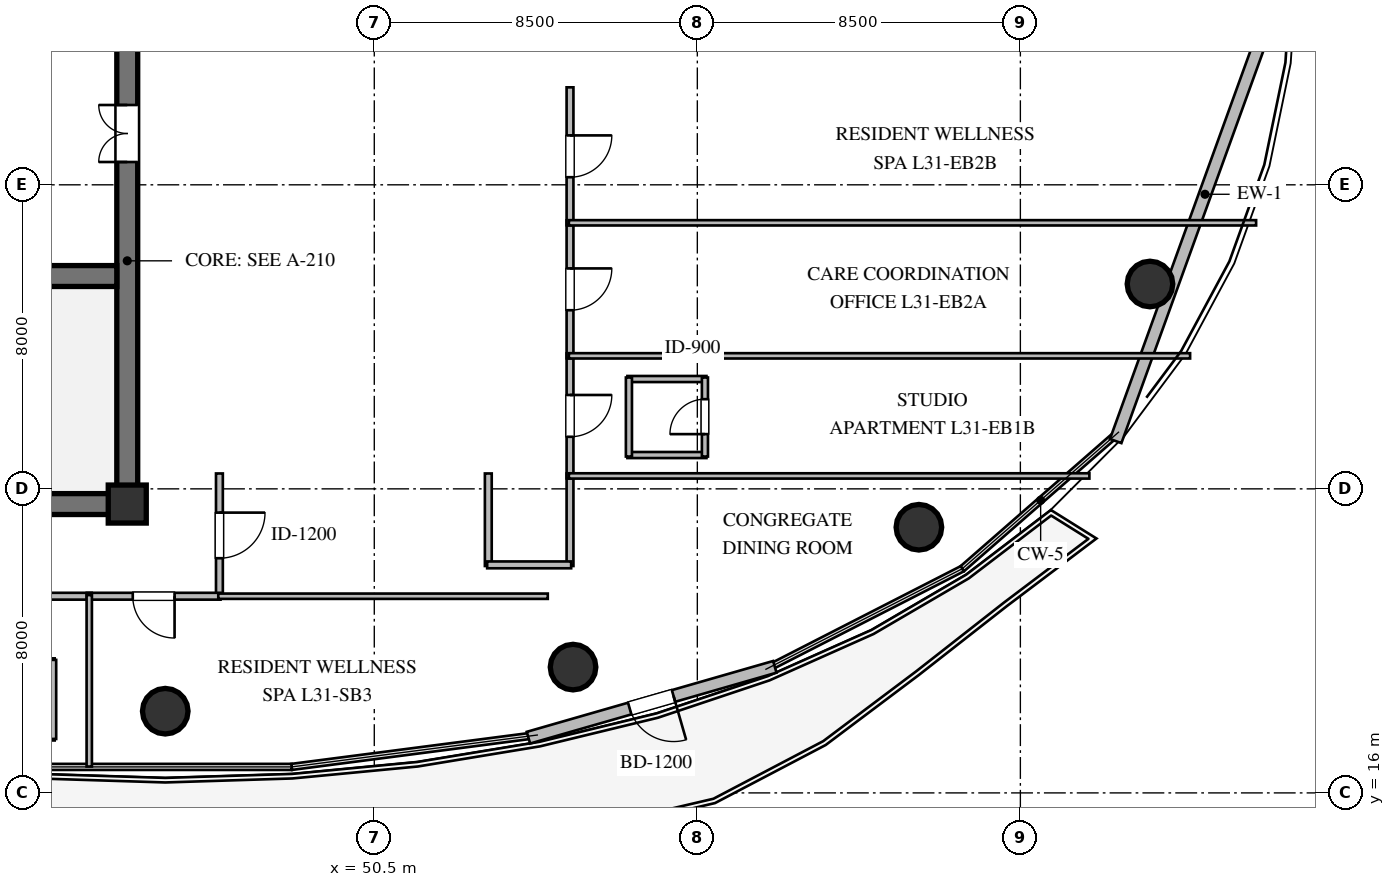
"""IFC4 building model, lengths in metres.
Left out: names, types, materials, properties, quantities, classifications, styles, units other than length and angle.
Written with IfcOpenShell. Run it as: python <this file> out.ifc"""

import sys

from ifc_helpers import new_model, si_unit, direction, frame, frame_2d, origin, origin_2d, place, context, subcontext, project, spatial, rectangle, circle, extrude, element, fill, save


model = new_model("IFC4")
c1 = context("Model", 3, precision=1e-05, world=origin(), true_north=direction((0.0, 1.0)))
c2 = subcontext(c1, "Body", "Model", "MODEL_VIEW")
j1 = project(units=[si_unit("LENGTHUNIT", "METRE"), si_unit("PLANEANGLEUNIT", "RADIAN")], contexts=[c1])
p1 = place(None, origin())
s1 = spatial("IfcSite", under=j1, at=p1, CompositionType="ELEMENT")
p2 = place(p1, origin())
s2 = spatial("IfcBuilding", under=s1, at=p2, CompositionType="ELEMENT")
p3 = place(p2, frame((0.0, 0.0, 120.6)))
s3 = spatial("IfcBuildingStorey", under=s2, at=p3, CompositionType="ELEMENT", Elevation=120.6)
p4 = place(p3, frame((21.725, 23.6, 0.0), z_axis=(0.0, 0.0, 1.0), x_axis=(1.0, 0.0, 0.0)))
e1 = element("IfcWall", 1, at=p4, inside=s3, PredefinedType="SHEAR", context=c2, shape_type="SweptSolid", body=[
    extrude(rectangle(XDim=22.55, YDim=0.55, at=frame_2d((11.275, 0.0))), origin(), (0.0, 0.0, 1.0), 3.36),
])
p5 = place(p3, frame((44.0, 23.875, 0.0), z_axis=(0.0, 0.0, 1.0), x_axis=(0.0, 1.0, 0.0)))
e2 = element("IfcWall", 2, at=p5, inside=s3, PredefinedType="SHEAR", context=c2, shape_type="SweptSolid", body=[
    extrude(rectangle(XDim=12.25, YDim=0.55, at=frame_2d((6.125, 0.0))), origin(), (0.0, 0.0, 1.0), 3.36),
])
p6 = place(p5, frame((8.725, 0.0, 0.0)))
e3 = element("IfcOpeningElement", 3, at=p6, cuts=e2, PredefinedType="OPENING", context=c2, shape_type="SweptSolid", body=[
    extrude(rectangle(XDim=1.5, YDim=2.15, at=frame_2d((0.75, 1.075))), frame((0.0, 0.285, 0.0), z_axis=(0.0, -1.0, 0.0), x_axis=(1.0, 0.0, 0.0)), (0.0, 0.0, 1.0), 0.57),
])
p7 = place(p3, frame((22.275, 29.6, 0.0), z_axis=(0.0, 0.0, 1.0), x_axis=(1.0, 0.0, 0.0)))
e4 = element("IfcWall", 4, at=p7, inside=s3, PredefinedType="SHEAR", context=c2, shape_type="SweptSolid", body=[
    extrude(rectangle(XDim=21.45, YDim=0.55, at=frame_2d((10.725, 0.0))), origin(), (0.0, 0.0, 1.0), 3.36),
])
p8 = place(p7, frame((12.175, 0.0, 0.0)))
e5 = element("IfcOpeningElement", 5, at=p8, cuts=e4, PredefinedType="OPENING", context=c2, shape_type="SweptSolid", body=[
    extrude(rectangle(XDim=1.15, YDim=2.1, at=frame_2d((0.575, 1.05))), frame((0.0, 0.285, 0.0), z_axis=(0.0, -1.0, 0.0), x_axis=(1.0, 0.0, 0.0)), (0.0, 0.0, 1.0), 0.57),
])
p9 = place(p3, frame((44.0, 23.6, 0.0), z_axis=(0.0, 0.0, 1.0), x_axis=(1.0, 0.0, 0.0)))
e6 = element("IfcColumn", 6, at=p9, inside=s3, PredefinedType="COLUMN", context=c2, shape_type="SweptSolid", body=[
    extrude(rectangle(XDim=1.0, YDim=1.0, at=origin_2d()), origin(), (0.0, 0.0, 1.0), 3.6),
])
for number, where, z_axis, x_axis in (
    (7, (45.0, 18.15, 0.0), (0.0, 0.0, 1.0), (1.0, 0.0, 0.0)),
    (8, (55.73, 19.31, 0.0), (0.0, 0.0, 1.0), (1.0, 0.0, 0.0)),
    (9, (64.83, 22.99, 0.0), (0.0, 0.0, 1.0), (1.0, 0.0, 0.0)),
    (10, (70.91, 29.39, 0.0), (0.0, 0.0, 1.0), (1.0, 0.0, 0.0)),
):
    element("IfcColumn", number, at=place(p3, frame(where, z_axis=z_axis, x_axis=x_axis)), inside=s3, PredefinedType="COLUMN", context=c2, shape_type="SweptSolid", body=[
        extrude(circle(Radius=0.6, at=origin_2d()), origin(), (0.0, 0.0, 1.0), 3.6),
    ])
p10 = place(p3, frame((74.708, 38.244, 0.0), z_axis=(0.0, 0.0, 1.0), x_axis=(-0.340324669139, -0.94030799187, 0.0)))
e11 = element("IfcWall", 11, at=p10, inside=s3, PredefinedType="STANDARD", context=c2, shape_type="SweptSolid", body=[
    extrude(rectangle(XDim=13.81, YDim=0.32, at=frame_2d((6.905, 0.0))), origin(), (0.0, 0.0, 1.0), 3.36),
])
p11 = place(p3, frame((61.039, 19.317, 0.0), z_axis=(0.0, 0.0, 1.0), x_axis=(-0.96106509915, -0.276322049784, 0.0)))
e12 = element("IfcWall", 12, at=p11, inside=s3, PredefinedType="STANDARD", context=c2, shape_type="SweptSolid", body=[
    extrude(rectangle(XDim=6.746, YDim=0.32, at=frame_2d((3.373, 0.0))), origin(), (0.0, 0.0, 1.0), 3.36),
])
p12 = place(p11, frame((2.773, 0.0, 0.0)))
e13 = element("IfcOpeningElement", 13, at=p12, cuts=e12, PredefinedType="OPENING", context=c2, shape_type="SweptSolid", body=[
    extrude(rectangle(XDim=1.2, YDim=2.15, at=frame_2d((0.6, 1.075))), frame((0.0, 0.17, 0.0), z_axis=(0.0, -1.0, 0.0), x_axis=(1.0, 0.0, 0.0)), (0.0, 0.0, 1.0), 0.34),
])
p13 = place(p3, frame((57.16, 24.89, 0.0), z_axis=(0.0, 0.0, 1.0), x_axis=(1.0, 0.0, 0.0)))
e14 = element("IfcWall", 14, at=p13, inside=s3, PredefinedType="PLUMBINGWALL", context=c2, shape_type="SweptSolid", body=[
    extrude(rectangle(XDim=2.08, YDim=0.16, at=frame_2d((1.04, 0.0))), origin(), (0.0, 0.0, 1.0), 3.36),
])
p14 = place(p3, frame((57.16, 26.89, 0.0), z_axis=(0.0, 0.0, 1.0), x_axis=(1.0, 0.0, 0.0)))
e15 = element("IfcWall", 15, at=p14, inside=s3, PredefinedType="PLUMBINGWALL", context=c2, shape_type="SweptSolid", body=[
    extrude(rectangle(XDim=2.08, YDim=0.16, at=frame_2d((1.04, 0.0))), origin(), (0.0, 0.0, 1.0), 2.89),
])
p15 = place(p3, frame((57.2, 24.85, 0.0), z_axis=(0.0, 0.0, 1.0), x_axis=(0.0, 1.0, 0.0)))
e16 = element("IfcWall", 16, at=p15, inside=s3, PredefinedType="PLUMBINGWALL", context=c2, shape_type="SweptSolid", body=[
    extrude(rectangle(XDim=2.08, YDim=0.16, at=frame_2d((1.04, 0.0))), origin(), (0.0, 0.0, 1.0), 3.36),
])
p16 = place(p3, frame((59.2, 24.85, 0.0), z_axis=(0.0, 0.0, 1.0), x_axis=(0.0, 1.0, 0.0)))
e17 = element("IfcWall", 17, at=p16, inside=s3, PredefinedType="PLUMBINGWALL", context=c2, shape_type="SweptSolid", body=[
    extrude(rectangle(XDim=2.08, YDim=0.16, at=frame_2d((1.04, 0.0))), origin(), (0.0, 0.0, 1.0), 2.996),
])
p17 = place(p16, frame((0.59, 0.0, 0.0)))
e18 = element("IfcOpeningElement", 18, at=p17, cuts=e17, PredefinedType="OPENING", context=c2, shape_type="SweptSolid", body=[
    extrude(rectangle(XDim=0.92, YDim=2.1, at=frame_2d((0.46, 1.05))), frame((0.0, 0.09, 0.0), z_axis=(0.0, -1.0, 0.0), x_axis=(1.0, 0.0, 0.0)), (0.0, 0.0, 1.0), 0.18),
])
for number, where, z_axis, x_axis in (
    (19, (40.01, 17.46, 0.0), (0.0, 0.0, 1.0), (1.0, 0.0, 0.0)),
    (20, (40.01, 19.46, 0.0), (0.0, 0.0, 1.0), (1.0, 0.0, 0.0)),
    (21, (42.05, 17.42, 0.0), (0.0, 0.0, 1.0), (0.0, 1.0, 0.0)),
):
    element("IfcWall", number, at=place(p3, frame(where, z_axis=z_axis, x_axis=x_axis)), inside=s3, PredefinedType="PLUMBINGWALL", context=c2, shape_type="SweptSolid", body=[
        extrude(rectangle(XDim=2.08, YDim=0.16, at=frame_2d((1.04, 0.0))), origin(), (0.0, 0.0, 1.0), 3.36),
    ])
p18 = place(p3, frame((46.425, 24.405, 0.0), z_axis=(0.0, 0.0, 1.0), x_axis=(0.0, -1.0, 0.0)))
e22 = element("IfcWall", 22, at=p18, inside=s3, PredefinedType="PARTITIONING", context=c2, shape_type="SweptSolid", body=[
    extrude(rectangle(XDim=3.26, YDim=0.18, at=frame_2d((1.63, 0.0))), origin(), (0.0, 0.0, 1.0), 3.36),
])
p19 = place(p18, frame((1.03, 0.0, 0.0)))
e23 = element("IfcOpeningElement", 23, at=p19, cuts=e22, PredefinedType="OPENING", context=c2, shape_type="SweptSolid", body=[
    extrude(rectangle(XDim=1.2, YDim=2.15, at=frame_2d((0.6, 1.075))), frame((0.0, 0.1, 0.0), z_axis=(0.0, -1.0, 0.0), x_axis=(1.0, 0.0, 0.0)), (0.0, 0.0, 1.0), 0.2),
])
for number, where, z_axis, x_axis in (
    (24, (55.65, 24.405, 0.0), (0.0, 0.0, 1.0), (0.0, -1.0, 0.0)),
    (25, (53.5, 21.97, 0.0), (0.0, 0.0, 1.0), (0.0, 1.0, 0.0)),
):
    element("IfcWall", number, at=place(p3, frame(where, z_axis=z_axis, x_axis=x_axis)), inside=s3, PredefinedType="PARTITIONING", context=c2, shape_type="SweptSolid", body=[
        extrude(rectangle(XDim=2.435, YDim=0.18, at=frame_2d((1.218, 0.0))), origin(), (0.0, 0.0, 1.0), 3.36),
    ])
p20 = place(p3, frame((55.68, 22.0, 0.0), z_axis=(0.0, 0.0, 1.0), x_axis=(-1.0, 0.0, 0.0)))
e26 = element("IfcWall", 26, at=p20, inside=s3, PredefinedType="PARTITIONING", context=c2, shape_type="SweptSolid", body=[
    extrude(rectangle(XDim=2.21, YDim=0.18, at=frame_2d((1.105, 0.0))), origin(), (0.0, 0.0, 1.0), 3.36),
])
p21 = place(p3, frame((55.65, 27.565, 0.0), z_axis=(0.0, 0.0, 1.0), x_axis=(0.0, -1.0, 0.0)))
e27 = element("IfcWall", 27, at=p21, inside=s3, PredefinedType="PARTITIONING", context=c2, shape_type="SweptSolid", body=[
    extrude(rectangle(XDim=3.29, YDim=0.18, at=frame_2d((1.645, 0.0))), origin(), (0.0, 0.0, 1.0), 3.36),
])
p22 = place(p21, frame((1.095, 0.0, 0.0)))
e28 = element("IfcOpeningElement", 28, at=p22, cuts=e27, PredefinedType="OPENING", context=c2, shape_type="SweptSolid", body=[
    extrude(rectangle(XDim=1.1, YDim=2.1, at=frame_2d((0.55, 1.05))), frame((0.0, 0.1, 0.0), z_axis=(0.0, -1.0, 0.0), x_axis=(1.0, 0.0, 0.0)), (0.0, 0.0, 1.0), 0.2),
])
p23 = place(p3, frame((55.65, 31.065, 0.0), z_axis=(0.0, 0.0, 1.0), x_axis=(0.0, -1.0, 0.0)))
e29 = element("IfcWall", 29, at=p23, inside=s3, PredefinedType="PARTITIONING", context=c2, shape_type="SweptSolid", body=[
    extrude(rectangle(XDim=3.63, YDim=0.18, at=frame_2d((1.815, 0.0))), origin(), (0.0, 0.0, 1.0), 3.36),
])
p24 = place(p23, frame((1.265, 0.0, 0.0)))
e30 = element("IfcOpeningElement", 30, at=p24, cuts=e29, PredefinedType="OPENING", context=c2, shape_type="SweptSolid", body=[
    extrude(rectangle(XDim=1.1, YDim=2.1, at=frame_2d((0.55, 1.05))), frame((0.0, 0.1, 0.0), z_axis=(0.0, -1.0, 0.0), x_axis=(1.0, 0.0, 0.0)), (0.0, 0.0, 1.0), 0.2),
])
p25 = place(p3, frame((55.65, 34.565, 0.0), z_axis=(0.0, 0.0, 1.0), x_axis=(0.0, -1.0, 0.0)))
e31 = element("IfcWall", 31, at=p25, inside=s3, PredefinedType="PARTITIONING", context=c2, shape_type="SweptSolid", body=[
    extrude(rectangle(XDim=3.63, YDim=0.18, at=frame_2d((1.815, 0.0))), origin(), (0.0, 0.0, 1.0), 3.36),
])
p26 = place(p25, frame((1.265, 0.0, 0.0)))
e32 = element("IfcOpeningElement", 32, at=p26, cuts=e31, PredefinedType="OPENING", context=c2, shape_type="SweptSolid", body=[
    extrude(rectangle(XDim=1.1, YDim=2.1, at=frame_2d((0.55, 1.05))), frame((0.0, 0.1, 0.0), z_axis=(0.0, -1.0, 0.0), x_axis=(1.0, 0.0, 0.0)), (0.0, 0.0, 1.0), 0.2),
])
p27 = place(p3, frame((43.065, 21.175, 0.0), z_axis=(0.0, 0.0, 1.0), x_axis=(-1.0, 0.0, 0.0)))
e33 = element("IfcWall", 33, at=p27, inside=s3, PredefinedType="PARTITIONING", context=c2, shape_type="SweptSolid", body=[
    extrude(rectangle(XDim=17.614, YDim=0.18, at=frame_2d((8.807, 0.0))), origin(), (0.0, 0.0, 1.0), 2.657),
])
p28 = place(p27, frame((6.515, 0.0, 0.0)))
e34 = element("IfcOpeningElement", 34, at=p28, cuts=e33, PredefinedType="OPENING", context=c2, shape_type="SweptSolid", body=[
    extrude(rectangle(XDim=1.1, YDim=2.1, at=frame_2d((0.55, 1.05))), frame((0.0, 0.1, 0.0), z_axis=(0.0, -1.0, 0.0), x_axis=(1.0, 0.0, 0.0)), (0.0, 0.0, 1.0), 0.2),
])
p29 = place(p3, frame((46.455, 21.175, 0.0), z_axis=(0.0, 0.0, 1.0), x_axis=(-1.0, 0.0, 0.0)))
e35 = element("IfcWall", 35, at=p29, inside=s3, PredefinedType="PARTITIONING", context=c2, shape_type="SweptSolid", body=[
    extrude(rectangle(XDim=3.52, YDim=0.18, at=frame_2d((1.76, 0.0))), origin(), (0.0, 0.0, 1.0), 2.996),
])
p30 = place(p29, frame((1.21, 0.0, 0.0)))
e36 = element("IfcOpeningElement", 36, at=p30, cuts=e35, PredefinedType="OPENING", context=c2, shape_type="SweptSolid", body=[
    extrude(rectangle(XDim=1.1, YDim=2.1, at=frame_2d((0.55, 1.05))), frame((0.0, 0.1, 0.0), z_axis=(0.0, -1.0, 0.0), x_axis=(1.0, 0.0, 0.0)), (0.0, 0.0, 1.0), 0.2),
])
p31 = place(p3, frame((55.62, 24.34, 0.0), z_axis=(0.0, 0.0, 1.0), x_axis=(1.0, 0.0, 0.0)))
e37 = element("IfcWall", 37, at=p31, inside=s3, PredefinedType="PARTITIONING", context=c2, shape_type="SweptSolid", body=[
    extrude(rectangle(XDim=13.696, YDim=0.14, at=frame_2d((6.848, 0.0))), origin(), (0.0, 0.0, 1.0), 3.36),
])
p32 = place(p3, frame((55.065, 21.175, 0.0), z_axis=(0.0, 0.0, 1.0), x_axis=(-1.0, 0.0, 0.0)))
e38 = element("IfcWall", 38, at=p32, inside=s3, PredefinedType="PARTITIONING", context=c2, shape_type="SweptSolid", body=[
    extrude(rectangle(XDim=8.67, YDim=0.14, at=frame_2d((4.335, 0.0))), origin(), (0.0, 0.0, 1.0), 2.996),
])
p33 = place(p3, frame((55.62, 27.5, 0.0), z_axis=(0.0, 0.0, 1.0), x_axis=(1.0, 0.0, 0.0)))
e39 = element("IfcWall", 39, at=p33, inside=s3, PredefinedType="PARTITIONING", context=c2, shape_type="SweptSolid", body=[
    extrude(rectangle(XDim=16.346, YDim=0.14, at=frame_2d((8.173, 0.0))), origin(), (0.0, 0.0, 1.0), 2.89),
])
p34 = place(p3, frame((55.62, 31.0, 0.0), z_axis=(0.0, 0.0, 1.0), x_axis=(1.0, 0.0, 0.0)))
e40 = element("IfcWall", 40, at=p34, inside=s3, PredefinedType="PARTITIONING", context=c2, shape_type="SweptSolid", body=[
    extrude(rectangle(XDim=18.083, YDim=0.14, at=frame_2d((9.042, 0.0))), origin(), (0.0, 0.0, 1.0), 3.36),
])
p35 = place(p3, frame((43.0, 21.205, 0.0), z_axis=(0.0, 0.0, 1.0), x_axis=(0.0, -1.0, 0.0)))
e41 = element("IfcWall", 41, at=p35, inside=s3, PredefinedType="PARTITIONING", context=c2, shape_type="SweptSolid", body=[
    extrude(rectangle(XDim=4.511, YDim=0.14, at=frame_2d((2.255, 0.0))), origin(), (0.0, 0.0, 1.0), 3.36),
])
p36 = place(p12, origin())
e42 = element("IfcDoor", 42, at=p36, inside=s3, OperationType="SINGLE_SWING_LEFT", PredefinedType="DOOR", context=c2, shape_type="SweptSolid", body=[
    extrude(rectangle(XDim=1.2, YDim=2.15, at=frame_2d((0.6, 1.075))), frame((0.0, 0.025, 0.0), z_axis=(0.0, -1.0, 0.0), x_axis=(1.0, 0.0, 0.0)), (0.0, 0.0, 1.0), 0.05),
])
fill(e13, e42)
p37 = place(p6, origin())
e43 = element("IfcDoor", 43, at=p37, inside=s3, OperationType="DOUBLE_DOOR_SINGLE_SWING", PredefinedType="DOOR", context=c2, shape_type="SweptSolid", body=[
    extrude(rectangle(XDim=1.5, YDim=2.15, at=frame_2d((0.75, 1.075))), frame((0.0, 0.025, 0.0), z_axis=(0.0, -1.0, 0.0), x_axis=(1.0, 0.0, 0.0)), (0.0, 0.0, 1.0), 0.05),
])
fill(e3, e43)
p38 = place(p17, origin())
e44 = element("IfcDoor", 44, at=p38, inside=s3, OperationType="SINGLE_SWING_LEFT", PredefinedType="DOOR", context=c2, shape_type="SweptSolid", body=[
    extrude(rectangle(XDim=0.92, YDim=2.1, at=frame_2d((0.46, 1.05))), frame((0.0, 0.025, 0.0), z_axis=(0.0, -1.0, 0.0), x_axis=(1.0, 0.0, 0.0)), (0.0, 0.0, 1.0), 0.05),
])
fill(e18, e44)
p39 = place(p19, origin())
e45 = element("IfcDoor", 45, at=p39, inside=s3, OperationType="SINGLE_SWING_LEFT", PredefinedType="DOOR", context=c2, shape_type="SweptSolid", body=[
    extrude(rectangle(XDim=1.2, YDim=2.15, at=frame_2d((0.6, 1.075))), frame((0.0, 0.025, 0.0), z_axis=(0.0, -1.0, 0.0), x_axis=(1.0, 0.0, 0.0)), (0.0, 0.0, 1.0), 0.05),
])
fill(e23, e45)
p40 = place(p22, origin())
e46 = element("IfcDoor", 46, at=p40, inside=s3, OperationType="SINGLE_SWING_LEFT", PredefinedType="DOOR", context=c2, shape_type="SweptSolid", body=[
    extrude(rectangle(XDim=1.1, YDim=2.1, at=frame_2d((0.55, 1.05))), frame((0.0, 0.025, 0.0), z_axis=(0.0, -1.0, 0.0), x_axis=(1.0, 0.0, 0.0)), (0.0, 0.0, 1.0), 0.05),
])
fill(e28, e46)
p41 = place(p24, origin())
e47 = element("IfcDoor", 47, at=p41, inside=s3, OperationType="SINGLE_SWING_LEFT", PredefinedType="DOOR", context=c2, shape_type="SweptSolid", body=[
    extrude(rectangle(XDim=1.1, YDim=2.1, at=frame_2d((0.55, 1.05))), frame((0.0, 0.025, 0.0), z_axis=(0.0, -1.0, 0.0), x_axis=(1.0, 0.0, 0.0)), (0.0, 0.0, 1.0), 0.05),
])
fill(e30, e47)
p42 = place(p26, origin())
e48 = element("IfcDoor", 48, at=p42, inside=s3, OperationType="SINGLE_SWING_LEFT", PredefinedType="DOOR", context=c2, shape_type="SweptSolid", body=[
    extrude(rectangle(XDim=1.1, YDim=2.1, at=frame_2d((0.55, 1.05))), frame((0.0, 0.025, 0.0), z_axis=(0.0, -1.0, 0.0), x_axis=(1.0, 0.0, 0.0)), (0.0, 0.0, 1.0), 0.05),
])
fill(e32, e48)
p43 = place(p30, origin())
e49 = element("IfcDoor", 49, at=p43, inside=s3, OperationType="SINGLE_SWING_LEFT", PredefinedType="DOOR", context=c2, shape_type="SweptSolid", body=[
    extrude(rectangle(XDim=1.1, YDim=2.1, at=frame_2d((0.55, 1.05))), frame((0.0, 0.025, 0.0), z_axis=(0.0, -1.0, 0.0), x_axis=(1.0, 0.0, 0.0)), (0.0, 0.0, 1.0), 0.05),
])
fill(e36, e49)
save(model, sys.argv[1])
